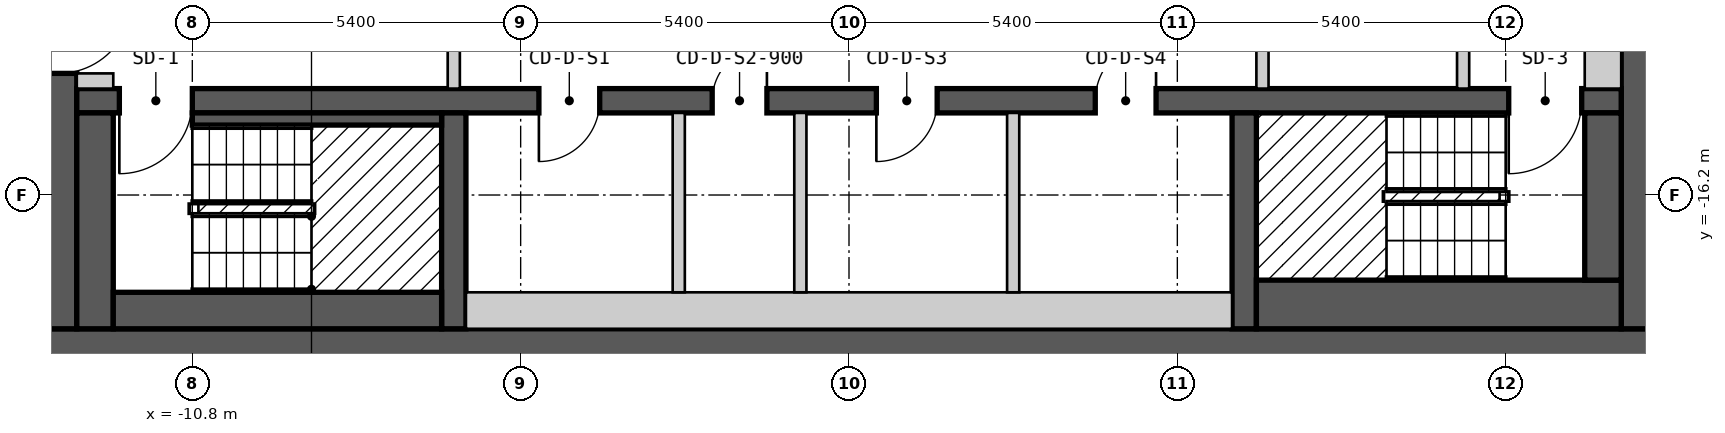
"""IFC4 building model, lengths in metres.
Left out: names, types, materials, properties, quantities, classifications, styles, units other than length and angle.
Written with IfcOpenShell. Run it as: python <this file> out.ifc"""

import sys

from ifc_helpers import new_model, si_unit, direction, frame, frame_2d, origin, place, context, subcontext, project, spatial, rectangle, extrude, element, fill, save


model = new_model("IFC4")
c1 = context("Model", 3, precision=1e-05, world=origin(), true_north=direction((0.0, 1.0)))
c2 = subcontext(c1, "Body", "Model", "MODEL_VIEW")
j1 = project(units=[si_unit("LENGTHUNIT", "METRE"), si_unit("PLANEANGLEUNIT", "RADIAN")], contexts=[c1])
p1 = place(None, origin())
s1 = spatial("IfcSite", under=j1, at=p1, CompositionType="ELEMENT")
p2 = place(p1, origin())
s2 = spatial("IfcBuilding", under=s1, at=p2, CompositionType="ELEMENT")
p3 = place(p2, frame((0.0, 0.0, 187.2)))
s3 = spatial("IfcBuildingStorey", under=s2, at=p3, CompositionType="ELEMENT", Elevation=187.2)
p4 = place(p3, frame((-13.3, -18.7, 0.0), z_axis=(0.0, 0.0, 1.0), x_axis=(1.0, 0.0, 0.0)))
e1 = element("IfcWall", 1, at=p4, inside=s3, PredefinedType="SHEAR", context=c2, shape_type="SweptSolid", body=[
    extrude(rectangle(XDim=26.6, YDim=0.6, at=frame_2d((13.3, 0.0))), origin(), (0.0, 0.0, 1.0), 2.7),
])
p5 = place(p3, frame((-13.0, -18.4, 0.0), z_axis=(0.0, 0.0, 1.0), x_axis=(0.0, 1.0, 0.0)))
e2 = element("IfcWall", 2, at=p5, inside=s3, PredefinedType="SHEAR", context=c2, shape_type="SweptSolid", body=[
    extrude(rectangle(XDim=12.8, YDim=0.6, at=frame_2d((6.4, 0.0))), origin(), (0.0, 0.0, 1.0), 2.7),
])
p6 = place(p5, frame((4.2, 0.0, 0.0)))
e3 = element("IfcOpeningElement", 3, at=p6, cuts=e2, PredefinedType="OPENING", context=c2, shape_type="SweptSolid", body=[
    extrude(rectangle(XDim=1.2, YDim=2.1, at=frame_2d((0.6, 1.05))), frame((0.0, 0.31, 0.0), z_axis=(0.0, -1.0, 0.0), x_axis=(1.0, 0.0, 0.0)), (0.0, 0.0, 1.0), 0.62),
])
p7 = place(p3, frame((13.0, -18.4, 0.0), z_axis=(0.0, 0.0, 1.0), x_axis=(0.0, 1.0, 0.0)))
e4 = element("IfcWall", 4, at=p7, inside=s3, PredefinedType="SHEAR", context=c2, shape_type="SweptSolid", body=[
    extrude(rectangle(XDim=12.8, YDim=0.6, at=frame_2d((6.4, 0.0))), origin(), (0.0, 0.0, 1.0), 2.7),
])
p8 = place(p3, frame((-12.7, -14.65, 0.0), z_axis=(0.0, 0.0, 1.0), x_axis=(1.0, 0.0, 0.0)))
e5 = element("IfcWall", 5, at=p8, inside=s3, PredefinedType="SHEAR", context=c2, shape_type="SweptSolid", body=[
    extrude(rectangle(XDim=25.4, YDim=0.4, at=frame_2d((12.7, 0.0))), origin(), (0.0, 0.0, 1.0), 2.7),
])
p9 = place(p8, frame((1.9, 0.0, 0.0), z_axis=(0.0, 0.0, 1.0), x_axis=(-1.0, 0.0, 0.0)))
e6 = element("IfcOpeningElement", 6, at=p9, cuts=e5, PredefinedType="OPENING", context=c2, shape_type="SweptSolid", body=[
    extrude(rectangle(XDim=1.2, YDim=2.1, at=frame_2d((0.6, 1.05))), frame((0.0, 0.21, 0.0), z_axis=(0.0, -1.0, 0.0), x_axis=(1.0, 0.0, 0.0)), (0.0, 0.0, 1.0), 0.42),
])
p10 = place(p8, frame((24.75, 0.0, 0.0), z_axis=(0.0, 0.0, 1.0), x_axis=(-1.0, 0.0, 0.0)))
e7 = element("IfcOpeningElement", 7, at=p10, cuts=e5, PredefinedType="OPENING", context=c2, shape_type="SweptSolid", body=[
    extrude(rectangle(XDim=1.2, YDim=2.1, at=frame_2d((0.6, 1.05))), frame((0.0, 0.21, 0.0), z_axis=(0.0, -1.0, 0.0), x_axis=(1.0, 0.0, 0.0)), (0.0, 0.0, 1.0), 0.42),
])
p11 = place(p8, frame((8.6, 0.0, 0.0), z_axis=(0.0, 0.0, 1.0), x_axis=(-1.0, 0.0, 0.0)))
e8 = element("IfcOpeningElement", 8, at=p11, cuts=e5, PredefinedType="OPENING", context=c2, shape_type="SweptSolid", body=[
    extrude(rectangle(XDim=1.0, YDim=2.1, at=frame_2d((0.5, 1.05))), frame((0.0, 0.21, 0.0), z_axis=(0.0, -1.0, 0.0), x_axis=(1.0, 0.0, 0.0)), (0.0, 0.0, 1.0), 0.42),
])
p12 = place(p8, frame((11.35, 0.0, 0.0), z_axis=(0.0, 0.0, 1.0), x_axis=(-1.0, 0.0, 0.0)))
e9 = element("IfcOpeningElement", 9, at=p12, cuts=e5, PredefinedType="OPENING", context=c2, shape_type="SweptSolid", body=[
    extrude(rectangle(XDim=0.9, YDim=2.1, at=frame_2d((0.45, 1.05))), frame((0.0, 0.21, 0.0), z_axis=(0.0, -1.0, 0.0), x_axis=(1.0, 0.0, 0.0)), (0.0, 0.0, 1.0), 0.42),
])
p13 = place(p8, frame((14.15, 0.0, 0.0), z_axis=(0.0, 0.0, 1.0), x_axis=(-1.0, 0.0, 0.0)))
e10 = element("IfcOpeningElement", 10, at=p13, cuts=e5, PredefinedType="OPENING", context=c2, shape_type="SweptSolid", body=[
    extrude(rectangle(XDim=1.0, YDim=2.1, at=frame_2d((0.5, 1.05))), frame((0.0, 0.21, 0.0), z_axis=(0.0, -1.0, 0.0), x_axis=(1.0, 0.0, 0.0)), (0.0, 0.0, 1.0), 0.42),
])
p14 = place(p8, frame((17.75, 0.0, 0.0), z_axis=(0.0, 0.0, 1.0), x_axis=(-1.0, 0.0, 0.0)))
e11 = element("IfcOpeningElement", 11, at=p14, cuts=e5, PredefinedType="OPENING", context=c2, shape_type="SweptSolid", body=[
    extrude(rectangle(XDim=1.0, YDim=2.1, at=frame_2d((0.5, 1.05))), frame((0.0, 0.21, 0.0), z_axis=(0.0, -1.0, 0.0), x_axis=(1.0, 0.0, 0.0)), (0.0, 0.0, 1.0), 0.42),
])
for number, where, z_axis, x_axis in (
    (12, (-6.5, -18.4, 0.0), (0.0, 0.0, 1.0), (0.0, 1.0, 0.0)),
    (13, (6.5, -18.4, 0.0), (0.0, 0.0, 1.0), (0.0, 1.0, 0.0)),
):
    element("IfcWall", number, at=place(p3, frame(where, z_axis=z_axis, x_axis=x_axis)), inside=s3, PredefinedType="SHEAR", context=c2, shape_type="SweptSolid", body=[
        extrude(rectangle(XDim=3.55, YDim=0.4, at=frame_2d((1.775, 0.0))), origin(), (0.0, 0.0, 1.0), 2.7),
    ])
p15 = place(p3, frame((-12.4, -18.4, 0.0), z_axis=(0.0, 0.0, 1.0), x_axis=(0.0, 1.0, 0.0)))
e14 = element("IfcWall", 14, at=p15, inside=s3, PredefinedType="SOLIDWALL", context=c2, shape_type="SweptSolid", body=[
    extrude(rectangle(XDim=3.55, YDim=0.6, at=frame_2d((1.775, 0.0))), origin(), (0.0, 0.0, 1.0), 2.7),
])
p16 = place(p3, frame((-12.7, -14.325, 0.0), z_axis=(0.0, 0.0, 1.0), x_axis=(1.0, 0.0, 0.0)))
e15 = element("IfcWall", 15, at=p16, inside=s3, PredefinedType="PARTITIONING", context=c2, shape_type="SweptSolid", body=[
    extrude(rectangle(XDim=0.6, YDim=0.25, at=frame_2d((0.3, 0.0))), origin(), (0.0, 0.0, 1.0), 2.7),
])
p17 = place(p3, frame((-12.1, -18.1, 0.0), z_axis=(0.0, 0.0, 1.0), x_axis=(1.0, 0.0, 0.0)))
e16 = element("IfcWall", 16, at=p17, inside=s3, PredefinedType="SOLIDWALL", context=c2, shape_type="SweptSolid", body=[
    extrude(rectangle(XDim=5.4, YDim=0.6, at=frame_2d((2.7, 0.0))), origin(), (0.0, 0.0, 1.0), 2.7),
])
p18 = place(p3, frame((-10.8, -14.95, 0.0), z_axis=(0.0, 0.0, 1.0), x_axis=(1.0, 0.0, 0.0)))
e17 = element("IfcWall", 17, at=p18, inside=s3, PredefinedType="SOLIDWALL", context=c2, shape_type="SweptSolid", body=[
    extrude(rectangle(XDim=4.1, YDim=0.2, at=frame_2d((2.05, 0.0))), origin(), (0.0, 0.0, 1.0), 2.7),
])
p19 = place(p3, frame((-6.5, -14.45, 0.0), z_axis=(0.0, 0.0, 1.0), x_axis=(0.0, 1.0, 0.0)))
e18 = element("IfcWall", 18, at=p19, inside=s3, PredefinedType="PARTITIONING", context=c2, shape_type="SweptSolid", body=[
    extrude(rectangle(XDim=4.9, YDim=0.2, at=frame_2d((2.45, 0.0))), origin(), (0.0, 0.0, 1.0), 2.7),
])
p20 = place(p19, frame((3.15, 0.0, 0.0), z_axis=(0.0, 0.0, 1.0), x_axis=(-1.0, 0.0, 0.0)))
e19 = element("IfcOpeningElement", 19, at=p20, cuts=e18, PredefinedType="OPENING", context=c2, shape_type="SweptSolid", body=[
    extrude(rectangle(XDim=1.4, YDim=2.1, at=frame_2d((0.7, 1.05))), frame((0.0, 0.11, 0.0), z_axis=(0.0, -1.0, 0.0), x_axis=(1.0, 0.0, 0.0)), (0.0, 0.0, 1.0), 0.22),
])
p21 = place(p3, frame((-6.3, -18.1, 0.0), z_axis=(0.0, 0.0, 1.0), x_axis=(1.0, 0.0, 0.0)))
e20 = element("IfcWall", 20, at=p21, inside=s3, PredefinedType="PARTITIONING", context=c2, shape_type="SweptSolid", body=[
    extrude(rectangle(XDim=12.6, YDim=0.6, at=frame_2d((6.3, 0.0))), origin(), (0.0, 0.0, 1.0), 2.7),
])
for number, where, z_axis, x_axis in (
    (21, (-2.8, -17.8, 0.0), (0.0, 0.0, 1.0), (0.0, 1.0, 0.0)),
    (22, (-0.8, -17.8, 0.0), (0.0, 0.0, 1.0), (0.0, 1.0, 0.0)),
    (23, (2.7, -17.8, 0.0), (0.0, 0.0, 1.0), (0.0, 1.0, 0.0)),
):
    element("IfcWall", number, at=place(p3, frame(where, z_axis=z_axis, x_axis=x_axis)), inside=s3, PredefinedType="PARTITIONING", context=c2, shape_type="SweptSolid", body=[
        extrude(rectangle(XDim=2.95, YDim=0.2, at=frame_2d((1.475, 0.0))), origin(), (0.0, 0.0, 1.0), 2.7),
    ])
p22 = place(p3, frame((6.7, -18.0, 0.0), z_axis=(0.0, 0.0, 1.0), x_axis=(1.0, 0.0, 0.0)))
e24 = element("IfcWall", 24, at=p22, inside=s3, PredefinedType="SOLIDWALL", context=c2, shape_type="SweptSolid", body=[
    extrude(rectangle(XDim=6.0, YDim=0.8, at=frame_2d((3.0, 0.0))), origin(), (0.0, 0.0, 1.0), 2.7),
])
p23 = place(p3, frame((6.8, -14.45, 0.0), z_axis=(0.0, 0.0, 1.0), x_axis=(0.0, 1.0, 0.0)))
e25 = element("IfcWall", 25, at=p23, inside=s3, PredefinedType="PARTITIONING", context=c2, shape_type="SweptSolid", body=[
    extrude(rectangle(XDim=2.0, YDim=0.2, at=frame_2d((1.0, 0.0))), origin(), (0.0, 0.0, 1.0), 2.7),
])
p24 = place(p3, frame((10.1, -14.45, 0.0), z_axis=(0.0, 0.0, 1.0), x_axis=(0.0, 1.0, 0.0)))
e26 = element("IfcWall", 26, at=p24, inside=s3, PredefinedType="PARTITIONING", context=c2, shape_type="SweptSolid", body=[
    extrude(rectangle(XDim=1.8, YDim=0.2, at=frame_2d((0.9, 0.0))), origin(), (0.0, 0.0, 1.0), 2.7),
])
p25 = place(p3, frame((12.4, -17.6, 0.0), z_axis=(0.0, 0.0, 1.0), x_axis=(0.0, 1.0, 0.0)))
e27 = element("IfcWall", 27, at=p25, inside=s3, PredefinedType="SOLIDWALL", context=c2, shape_type="SweptSolid", body=[
    extrude(rectangle(XDim=2.75, YDim=0.6, at=frame_2d((1.375, 0.0))), origin(), (0.0, 0.0, 1.0), 2.7),
])
p26 = place(p3, frame((12.4, -14.45, 0.0), z_axis=(0.0, 0.0, 1.0), x_axis=(0.0, 1.0, 0.0)))
e28 = element("IfcWall", 28, at=p26, inside=s3, PredefinedType="PARTITIONING", context=c2, shape_type="SweptSolid", body=[
    extrude(rectangle(XDim=8.25, YDim=0.6, at=frame_2d((4.125, 0.0))), origin(), (0.0, 0.0, 1.0), 2.7),
])
p27 = place(p9, origin())
e29 = element("IfcDoor", 29, at=p27, inside=s3, OperationType="SINGLE_SWING_RIGHT", PredefinedType="DOOR", context=c2, shape_type="SweptSolid", body=[
    extrude(rectangle(XDim=1.2, YDim=2.1, at=frame_2d((0.6, 1.05))), frame((0.0, 0.025, 0.0), z_axis=(0.0, -1.0, 0.0), x_axis=(1.0, 0.0, 0.0)), (0.0, 0.0, 1.0), 0.05),
])
fill(e6, e29)
p28 = place(p10, origin())
e30 = element("IfcDoor", 30, at=p28, inside=s3, OperationType="SINGLE_SWING_RIGHT", PredefinedType="DOOR", context=c2, shape_type="SweptSolid", body=[
    extrude(rectangle(XDim=1.2, YDim=2.1, at=frame_2d((0.6, 1.05))), frame((0.0, 0.025, 0.0), z_axis=(0.0, -1.0, 0.0), x_axis=(1.0, 0.0, 0.0)), (0.0, 0.0, 1.0), 0.05),
])
fill(e7, e30)
p29 = place(p6, origin())
e31 = element("IfcDoor", 31, at=p29, inside=s3, OperationType="SINGLE_SWING_RIGHT", PredefinedType="DOOR", context=c2, shape_type="SweptSolid", body=[
    extrude(rectangle(XDim=1.2, YDim=2.1, at=frame_2d((0.6, 1.05))), frame((0.0, 0.025, 0.0), z_axis=(0.0, -1.0, 0.0), x_axis=(1.0, 0.0, 0.0)), (0.0, 0.0, 1.0), 0.05),
])
fill(e3, e31)
p30 = place(p11, origin())
e32 = element("IfcDoor", 32, at=p30, inside=s3, OperationType="SINGLE_SWING_RIGHT", PredefinedType="DOOR", context=c2, shape_type="SweptSolid", body=[
    extrude(rectangle(XDim=1.0, YDim=2.1, at=frame_2d((0.5, 1.05))), frame((0.0, 0.025, 0.0), z_axis=(0.0, -1.0, 0.0), x_axis=(1.0, 0.0, 0.0)), (0.0, 0.0, 1.0), 0.05),
])
fill(e8, e32)
p31 = place(p12, origin())
e33 = element("IfcDoor", 33, at=p31, inside=s3, OperationType="SINGLE_SWING_LEFT", PredefinedType="DOOR", context=c2, shape_type="SweptSolid", body=[
    extrude(rectangle(XDim=0.9, YDim=2.1, at=frame_2d((0.45, 1.05))), frame((0.0, 0.025, 0.0), z_axis=(0.0, -1.0, 0.0), x_axis=(1.0, 0.0, 0.0)), (0.0, 0.0, 1.0), 0.05),
])
fill(e9, e33)
p32 = place(p13, origin())
e34 = element("IfcDoor", 34, at=p32, inside=s3, OperationType="SINGLE_SWING_RIGHT", PredefinedType="DOOR", context=c2, shape_type="SweptSolid", body=[
    extrude(rectangle(XDim=1.0, YDim=2.1, at=frame_2d((0.5, 1.05))), frame((0.0, 0.025, 0.0), z_axis=(0.0, -1.0, 0.0), x_axis=(1.0, 0.0, 0.0)), (0.0, 0.0, 1.0), 0.05),
])
fill(e10, e34)
p33 = place(p14, origin())
e35 = element("IfcDoor", 35, at=p33, inside=s3, OperationType="SINGLE_SWING_LEFT", PredefinedType="DOOR", context=c2, shape_type="SweptSolid", body=[
    extrude(rectangle(XDim=1.0, YDim=2.1, at=frame_2d((0.5, 1.05))), frame((0.0, 0.025, 0.0), z_axis=(0.0, -1.0, 0.0), x_axis=(1.0, 0.0, 0.0)), (0.0, 0.0, 1.0), 0.05),
])
fill(e11, e35)
save(model, sys.argv[1])
